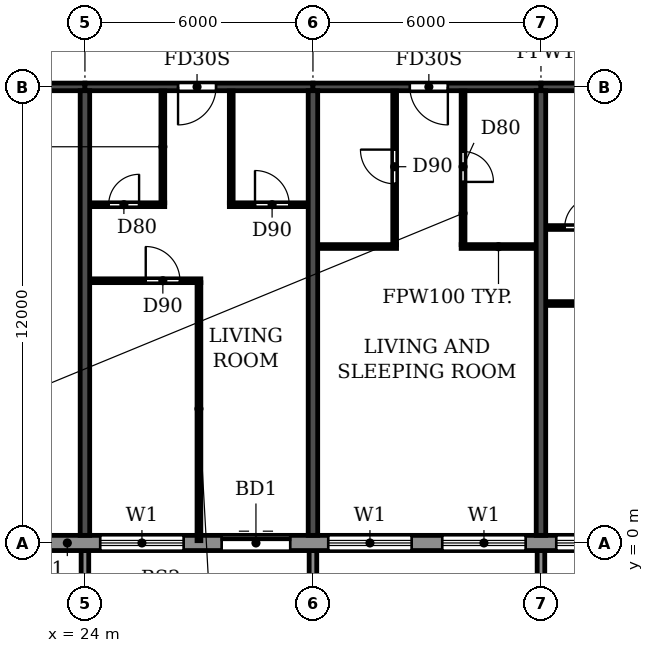
"""IFC4 building model, lengths in metres.
Left out: names, types, materials, properties, quantities, classifications, styles, units other than length and angle.
Written with IfcOpenShell. Run it as: python <this file> out.ifc"""

import sys

from ifc_helpers import new_model, si_unit, direction, frame, frame_2d, origin, place, context, subcontext, project, spatial, polyline, rectangle, outline, extrude, source, transform, mapped, element, fill, save


model = new_model("IFC4")
c1 = context("Model", 3, precision=1e-05, world=origin(), true_north=direction((0.0, 1.0)))
c2 = subcontext(c1, "Body", "Model", "MODEL_VIEW")
j1 = project(units=[si_unit("LENGTHUNIT", "METRE"), si_unit("PLANEANGLEUNIT", "RADIAN")], contexts=[c1])
p1 = place(None, origin())
s1 = spatial("IfcSite", under=j1, at=p1, CompositionType="ELEMENT")
p2 = place(p1, origin())
s2 = spatial("IfcBuilding", under=s1, at=p2, CompositionType="ELEMENT")
p3 = place(p2, frame((0.0, 0.0, 191.7)))
s3 = spatial("IfcBuildingStorey", under=s2, at=p3, CompositionType="ELEMENT", Elevation=191.7)
for number, where, z_axis, x_axis in (
    (1, (24.0, 0.2, 0.0), (0.0, 0.0, 1.0), (0.0, 1.0, 0.0)),
    (2, (30.0, 0.2, 0.0), (0.0, 0.0, 1.0), (0.0, 1.0, 0.0)),
    (3, (36.0, 0.2, 0.0), (0.0, 0.0, 1.0), (0.0, 1.0, 0.0)),
):
    element("IfcWall", number, at=place(p3, frame(where, z_axis=z_axis, x_axis=x_axis)), inside=s3, PredefinedType="SHEAR", context=c2, shape_type="SweptSolid", body=[
        extrude(rectangle(XDim=11.7, YDim=0.25, at=frame_2d((5.85, 0.0))), origin(), (0.0, 0.0, 1.0), 3.08),
    ])
p4 = place(p3, frame((18.2, 12.0, 0.0), z_axis=(0.0, 0.0, 1.0), x_axis=(1.0, 0.0, 0.0)))
e4 = element("IfcWall", 4, at=p4, inside=s3, PredefinedType="SHEAR", context=c2, shape_type="SweptSolid", body=[
    extrude(rectangle(XDim=5.8, YDim=0.2, at=frame_2d((2.9, 0.0))), origin(), (0.0, 0.0, 1.0), 2.48),
])
p5 = place(p4, frame((2.3, 0.0, 0.0)))
e5 = element("IfcOpeningElement", 5, at=p5, cuts=e4, PredefinedType="OPENING", context=c2, shape_type="SweptSolid", body=[
    extrude(rectangle(XDim=1.0, YDim=2.1, at=frame_2d((0.5, 1.05))), frame((0.0, 0.11, 0.0), z_axis=(0.0, -1.0, 0.0), x_axis=(1.0, 0.0, 0.0)), (0.0, 0.0, 1.0), 0.22),
])
p6 = place(p3, frame((24.0, 12.0, 0.0), z_axis=(0.0, 0.0, 1.0), x_axis=(1.0, 0.0, 0.0)))
e6 = element("IfcWall", 6, at=p6, inside=s3, PredefinedType="SHEAR", context=c2, shape_type="SweptSolid", body=[
    extrude(rectangle(XDim=6.0, YDim=0.2, at=frame_2d((3.0, 0.0))), origin(), (0.0, 0.0, 1.0), 2.48),
])
p7 = place(p6, frame((2.45, 0.0, 0.0)))
e7 = element("IfcOpeningElement", 7, at=p7, cuts=e6, PredefinedType="OPENING", context=c2, shape_type="SweptSolid", body=[
    extrude(rectangle(XDim=1.0, YDim=2.1, at=frame_2d((0.5, 1.05))), frame((0.0, 0.11, 0.0), z_axis=(0.0, -1.0, 0.0), x_axis=(1.0, 0.0, 0.0)), (0.0, 0.0, 1.0), 0.22),
])
p8 = place(p3, frame((30.0, 12.0, 0.0), z_axis=(0.0, 0.0, 1.0), x_axis=(1.0, 0.0, 0.0)))
e8 = element("IfcWall", 8, at=p8, inside=s3, PredefinedType="SHEAR", context=c2, shape_type="SweptSolid", body=[
    extrude(rectangle(XDim=6.0, YDim=0.2, at=frame_2d((3.0, 0.0))), origin(), (0.0, 0.0, 1.0), 2.48),
])
p9 = place(p8, frame((2.55, 0.0, 0.0)))
e9 = element("IfcOpeningElement", 9, at=p9, cuts=e8, PredefinedType="OPENING", context=c2, shape_type="SweptSolid", body=[
    extrude(rectangle(XDim=1.0, YDim=2.1, at=frame_2d((0.5, 1.05))), frame((0.0, 0.11, 0.0), z_axis=(0.0, -1.0, 0.0), x_axis=(1.0, 0.0, 0.0)), (0.0, 0.0, 1.0), 0.22),
])
p10 = place(p3, frame((36.0, 12.0, 0.0), z_axis=(0.0, 0.0, 1.0), x_axis=(1.0, 0.0, 0.0)))
e10 = element("IfcWall", 10, at=p10, inside=s3, PredefinedType="SHEAR", context=c2, shape_type="SweptSolid", body=[
    extrude(rectangle(XDim=6.0, YDim=0.2, at=frame_2d((3.0, 0.0))), origin(), (0.0, 0.0, 1.0), 2.48),
])
p11 = place(p10, frame((2.45, 0.0, 0.0)))
e11 = element("IfcOpeningElement", 11, at=p11, cuts=e10, PredefinedType="OPENING", context=c2, shape_type="SweptSolid", body=[
    extrude(rectangle(XDim=1.0, YDim=2.1, at=frame_2d((0.5, 1.05))), frame((0.0, 0.11, 0.0), z_axis=(0.0, -1.0, 0.0), x_axis=(1.0, 0.0, 0.0)), (0.0, 0.0, 1.0), 0.22),
])
p12 = place(p3, frame((22.683, 0.0, 0.0), z_axis=(0.0, 0.0, 1.0), x_axis=(1.0, 0.0, 0.0)))
e12 = element("IfcWall", 12, at=p12, inside=s3, PredefinedType="STANDARD", context=c2, shape_type="SweptSolid", body=[
    extrude(rectangle(XDim=56.634, YDim=0.4, at=frame_2d((28.317, 0.0))), origin(), (0.0, 0.0, 1.0), 3.08),
])
p13 = place(p12, frame((1.717, 0.0, 0.9)))
e13 = element("IfcOpeningElement", 13, at=p13, cuts=e12, PredefinedType="OPENING", context=c2, shape_type="SweptSolid", body=[
    extrude(rectangle(XDim=2.2, YDim=1.5, at=frame_2d((1.1, 0.75))), frame((0.0, 0.21, 0.0), z_axis=(0.0, -1.0, 0.0), x_axis=(1.0, 0.0, 0.0)), (0.0, 0.0, 1.0), 0.42),
])
p14 = place(p12, frame((4.917, 0.0, 0.0)))
e14 = element("IfcOpeningElement", 14, at=p14, cuts=e12, PredefinedType="OPENING", context=c2, shape_type="SweptSolid", body=[
    extrude(rectangle(XDim=1.8, YDim=2.4, at=frame_2d((0.9, 1.2))), frame((0.0, 0.21, 0.0), z_axis=(0.0, -1.0, 0.0), x_axis=(1.0, 0.0, 0.0)), (0.0, 0.0, 1.0), 0.42),
])
p15 = place(p12, frame((7.717, 0.0, 0.9)))
e15 = element("IfcOpeningElement", 15, at=p15, cuts=e12, PredefinedType="OPENING", context=c2, shape_type="SweptSolid", body=[
    extrude(rectangle(XDim=2.2, YDim=1.5, at=frame_2d((1.1, 0.75))), frame((0.0, 0.21, 0.0), z_axis=(0.0, -1.0, 0.0), x_axis=(1.0, 0.0, 0.0)), (0.0, 0.0, 1.0), 0.42),
])
p16 = place(p12, frame((10.717, 0.0, 0.9)))
e16 = element("IfcOpeningElement", 16, at=p16, cuts=e12, PredefinedType="OPENING", context=c2, shape_type="SweptSolid", body=[
    extrude(rectangle(XDim=2.2, YDim=1.5, at=frame_2d((1.1, 0.75))), frame((0.0, 0.21, 0.0), z_axis=(0.0, -1.0, 0.0), x_axis=(1.0, 0.0, 0.0)), (0.0, 0.0, 1.0), 0.42),
])
p17 = place(p12, frame((13.717, 0.0, 0.9)))
e17 = element("IfcOpeningElement", 17, at=p17, cuts=e12, PredefinedType="OPENING", context=c2, shape_type="SweptSolid", body=[
    extrude(rectangle(XDim=2.2, YDim=1.5, at=frame_2d((1.1, 0.75))), frame((0.0, 0.21, 0.0), z_axis=(0.0, -1.0, 0.0), x_axis=(1.0, 0.0, 0.0)), (0.0, 0.0, 1.0), 0.42),
])
p18 = place(p12, frame((16.917, 0.0, 0.0)))
e18 = element("IfcOpeningElement", 18, at=p18, cuts=e12, PredefinedType="OPENING", context=c2, shape_type="SweptSolid", body=[
    extrude(rectangle(XDim=1.8, YDim=2.4, at=frame_2d((0.9, 1.2))), frame((0.0, 0.21, 0.0), z_axis=(0.0, -1.0, 0.0), x_axis=(1.0, 0.0, 0.0)), (0.0, 0.0, 1.0), 0.42),
])
p19 = place(p12, frame((19.717, 0.0, 0.9)))
e19 = element("IfcOpeningElement", 19, at=p19, cuts=e12, PredefinedType="OPENING", context=c2, shape_type="SweptSolid", body=[
    extrude(rectangle(XDim=2.2, YDim=1.5, at=frame_2d((1.1, 0.75))), frame((0.0, 0.21, 0.0), z_axis=(0.0, -1.0, 0.0), x_axis=(1.0, 0.0, 0.0)), (0.0, 0.0, 1.0), 0.42),
])
p20 = place(p12, frame((22.717, 0.0, 0.9)))
e20 = element("IfcOpeningElement", 20, at=p20, cuts=e12, PredefinedType="OPENING", context=c2, shape_type="SweptSolid", body=[
    extrude(rectangle(XDim=2.2, YDim=1.5, at=frame_2d((1.1, 0.75))), frame((0.0, 0.21, 0.0), z_axis=(0.0, -1.0, 0.0), x_axis=(1.0, 0.0, 0.0)), (0.0, 0.0, 1.0), 0.42),
])
p21 = place(p12, frame((25.917, 0.0, 0.0)))
e21 = element("IfcOpeningElement", 21, at=p21, cuts=e12, PredefinedType="OPENING", context=c2, shape_type="SweptSolid", body=[
    extrude(rectangle(XDim=1.8, YDim=2.4, at=frame_2d((0.9, 1.2))), frame((0.0, 0.21, 0.0), z_axis=(0.0, -1.0, 0.0), x_axis=(1.0, 0.0, 0.0)), (0.0, 0.0, 1.0), 0.42),
])
p22 = place(p12, frame((28.717, 0.0, 0.9)))
e22 = element("IfcOpeningElement", 22, at=p22, cuts=e12, PredefinedType="OPENING", context=c2, shape_type="SweptSolid", body=[
    extrude(rectangle(XDim=2.2, YDim=1.5, at=frame_2d((1.1, 0.75))), frame((0.0, 0.21, 0.0), z_axis=(0.0, -1.0, 0.0), x_axis=(1.0, 0.0, 0.0)), (0.0, 0.0, 1.0), 0.42),
])
p23 = place(p12, frame((31.717, 0.0, 0.9)))
e23 = element("IfcOpeningElement", 23, at=p23, cuts=e12, PredefinedType="OPENING", context=c2, shape_type="SweptSolid", body=[
    extrude(rectangle(XDim=2.2, YDim=1.5, at=frame_2d((1.1, 0.75))), frame((0.0, 0.21, 0.0), z_axis=(0.0, -1.0, 0.0), x_axis=(1.0, 0.0, 0.0)), (0.0, 0.0, 1.0), 0.42),
])
p24 = place(p12, frame((34.717, 0.0, 0.9)))
e24 = element("IfcOpeningElement", 24, at=p24, cuts=e12, PredefinedType="OPENING", context=c2, shape_type="SweptSolid", body=[
    extrude(rectangle(XDim=2.2, YDim=1.5, at=frame_2d((1.1, 0.75))), frame((0.0, 0.21, 0.0), z_axis=(0.0, -1.0, 0.0), x_axis=(1.0, 0.0, 0.0)), (0.0, 0.0, 1.0), 0.42),
])
p25 = place(p12, frame((37.717, 0.0, 0.9)))
e25 = element("IfcOpeningElement", 25, at=p25, cuts=e12, PredefinedType="OPENING", context=c2, shape_type="SweptSolid", body=[
    extrude(rectangle(XDim=2.2, YDim=1.5, at=frame_2d((1.1, 0.75))), frame((0.0, 0.21, 0.0), z_axis=(0.0, -1.0, 0.0), x_axis=(1.0, 0.0, 0.0)), (0.0, 0.0, 1.0), 0.42),
])
p26 = place(p12, frame((40.917, 0.0, 0.0)))
e26 = element("IfcOpeningElement", 26, at=p26, cuts=e12, PredefinedType="OPENING", context=c2, shape_type="SweptSolid", body=[
    extrude(rectangle(XDim=1.8, YDim=2.4, at=frame_2d((0.9, 1.2))), frame((0.0, 0.21, 0.0), z_axis=(0.0, -1.0, 0.0), x_axis=(1.0, 0.0, 0.0)), (0.0, 0.0, 1.0), 0.42),
])
p27 = place(p12, frame((43.717, 0.0, 0.9)))
e27 = element("IfcOpeningElement", 27, at=p27, cuts=e12, PredefinedType="OPENING", context=c2, shape_type="SweptSolid", body=[
    extrude(rectangle(XDim=2.2, YDim=1.5, at=frame_2d((1.1, 0.75))), frame((0.0, 0.21, 0.0), z_axis=(0.0, -1.0, 0.0), x_axis=(1.0, 0.0, 0.0)), (0.0, 0.0, 1.0), 0.42),
])
p28 = place(p12, frame((46.717, 0.0, 0.9)))
e28 = element("IfcOpeningElement", 28, at=p28, cuts=e12, PredefinedType="OPENING", context=c2, shape_type="SweptSolid", body=[
    extrude(rectangle(XDim=2.2, YDim=1.5, at=frame_2d((1.1, 0.75))), frame((0.0, 0.21, 0.0), z_axis=(0.0, -1.0, 0.0), x_axis=(1.0, 0.0, 0.0)), (0.0, 0.0, 1.0), 0.42),
])
p29 = place(p12, frame((49.917, 0.0, 0.0)))
e29 = element("IfcOpeningElement", 29, at=p29, cuts=e12, PredefinedType="OPENING", context=c2, shape_type="SweptSolid", body=[
    extrude(rectangle(XDim=1.8, YDim=2.4, at=frame_2d((0.9, 1.2))), frame((0.0, 0.21, 0.0), z_axis=(0.0, -1.0, 0.0), x_axis=(1.0, 0.0, 0.0)), (0.0, 0.0, 1.0), 0.42),
])
p30 = place(p12, frame((52.717, 0.0, 0.9)))
e30 = element("IfcOpeningElement", 30, at=p30, cuts=e12, PredefinedType="OPENING", context=c2, shape_type="SweptSolid", body=[
    extrude(rectangle(XDim=2.2, YDim=1.5, at=frame_2d((1.1, 0.75))), frame((0.0, 0.21, 0.0), z_axis=(0.0, -1.0, 0.0), x_axis=(1.0, 0.0, 0.0)), (0.0, 0.0, 1.0), 0.42),
])
m1 = source(origin(), c2, "Body", "SweptSolid", [
    extrude(outline(polyline([(0.0, 0.0), (0.2, 0.0), (0.2, 1.65), (0.0, 1.65), (0.0, 0.0)])), origin(), (0.0, 0.0, 1.0), 3.1),
])
for number, where in (
    (31, (23.9, -1.85, 0.0)),
    (32, (29.9, -1.85, 0.0)),
    (33, (35.9, -1.85, 0.0)),
):
    element("IfcWall", number, at=place(p3, frame(where)), inside=s3, PredefinedType="STANDARD", context=c2, shape_type="MappedRepresentation", body=[
        mapped(m1, transform((0.0, 0.0, 0.0))),
    ])
p31 = place(p3, frame((36.135, 6.3, 0.0), z_axis=(0.0, 0.0, 1.0), x_axis=(1.0, 0.0, 0.0)))
e34 = element("IfcWall", 34, at=p31, inside=s3, PredefinedType="PARTITIONING", context=c2, shape_type="SweptSolid", body=[
    extrude(rectangle(XDim=2.915, YDim=0.1, at=frame_2d((1.458, 0.0))), origin(), (0.0, 0.0, 1.0), 3.08),
])
p32 = place(p31, frame((1.465, 0.0, 0.0)))
e35 = element("IfcOpeningElement", 35, at=p32, cuts=e34, PredefinedType="OPENING", context=c2, shape_type="SweptSolid", body=[
    extrude(rectangle(XDim=0.9, YDim=2.1, at=frame_2d((0.45, 1.05))), frame((0.0, 0.06, 0.0), z_axis=(0.0, -1.0, 0.0), x_axis=(1.0, 0.0, 0.0)), (0.0, 0.0, 1.0), 0.12),
])
p33 = place(p3, frame((24.135, 6.9, 0.0), z_axis=(0.0, 0.0, 1.0), x_axis=(1.0, 0.0, 0.0)))
e36 = element("IfcWall", 36, at=p33, inside=s3, PredefinedType="PARTITIONING", context=c2, shape_type="SweptSolid", body=[
    extrude(rectangle(XDim=2.915, YDim=0.1, at=frame_2d((1.458, 0.0))), origin(), (0.0, 0.0, 1.0), 3.08),
])
p34 = place(p33, frame((1.465, 0.0, 0.0)))
e37 = element("IfcOpeningElement", 37, at=p34, cuts=e36, PredefinedType="OPENING", context=c2, shape_type="SweptSolid", body=[
    extrude(rectangle(XDim=0.9, YDim=2.1, at=frame_2d((0.45, 1.05))), frame((0.0, 0.06, 0.0), z_axis=(0.0, -1.0, 0.0), x_axis=(1.0, 0.0, 0.0)), (0.0, 0.0, 1.0), 0.12),
])
p35 = place(p3, frame((30.135, 7.8, 0.0), z_axis=(0.0, 0.0, 1.0), x_axis=(1.0, 0.0, 0.0)))
e38 = element("IfcWall", 38, at=p35, inside=s3, PredefinedType="PARTITIONING", context=c2, shape_type="SweptSolid", body=[
    extrude(rectangle(XDim=2.065, YDim=0.1, at=frame_2d((1.032, 0.0))), origin(), (0.0, 0.0, 1.0), 3.08),
])
p36 = place(p3, frame((33.9, 7.8, 0.0), z_axis=(0.0, 0.0, 1.0), x_axis=(1.0, 0.0, 0.0)))
e39 = element("IfcWall", 39, at=p36, inside=s3, PredefinedType="PARTITIONING", context=c2, shape_type="SweptSolid", body=[
    extrude(rectangle(XDim=1.965, YDim=0.1, at=frame_2d((0.982, 0.0))), origin(), (0.0, 0.0, 1.0), 3.08),
])
p37 = place(p3, frame((36.135, 8.3, 0.0), z_axis=(0.0, 0.0, 1.0), x_axis=(1.0, 0.0, 0.0)))
e40 = element("IfcWall", 40, at=p37, inside=s3, PredefinedType="PARTITIONING", context=c2, shape_type="SweptSolid", body=[
    extrude(rectangle(XDim=1.965, YDim=0.1, at=frame_2d((0.982, 0.0))), origin(), (0.0, 0.0, 1.0), 3.08),
])
p38 = place(p37, frame((0.49, 0.0, 0.0)))
e41 = element("IfcOpeningElement", 41, at=p38, cuts=e40, PredefinedType="OPENING", context=c2, shape_type="SweptSolid", body=[
    extrude(rectangle(XDim=0.8, YDim=2.1, at=frame_2d((0.4, 1.05))), frame((0.0, 0.06, 0.0), z_axis=(0.0, -1.0, 0.0), x_axis=(1.0, 0.0, 0.0)), (0.0, 0.0, 1.0), 0.12),
])
p39 = place(p3, frame((24.135, 8.9, 0.0), z_axis=(0.0, 0.0, 1.0), x_axis=(1.0, 0.0, 0.0)))
e42 = element("IfcWall", 42, at=p39, inside=s3, PredefinedType="PARTITIONING", context=c2, shape_type="SweptSolid", body=[
    extrude(rectangle(XDim=1.965, YDim=0.1, at=frame_2d((0.982, 0.0))), origin(), (0.0, 0.0, 1.0), 3.08),
])
p40 = place(p39, frame((0.49, 0.0, 0.0)))
e43 = element("IfcOpeningElement", 43, at=p40, cuts=e42, PredefinedType="OPENING", context=c2, shape_type="SweptSolid", body=[
    extrude(rectangle(XDim=0.8, YDim=2.1, at=frame_2d((0.4, 1.05))), frame((0.0, 0.06, 0.0), z_axis=(0.0, -1.0, 0.0), x_axis=(1.0, 0.0, 0.0)), (0.0, 0.0, 1.0), 0.12),
])
p41 = place(p3, frame((27.8, 8.9, 0.0), z_axis=(0.0, 0.0, 1.0), x_axis=(1.0, 0.0, 0.0)))
e44 = element("IfcWall", 44, at=p41, inside=s3, PredefinedType="PARTITIONING", context=c2, shape_type="SweptSolid", body=[
    extrude(rectangle(XDim=2.065, YDim=0.1, at=frame_2d((1.032, 0.0))), origin(), (0.0, 0.0, 1.0), 3.08),
])
p42 = place(p41, frame((0.675, 0.0, 0.0)))
e45 = element("IfcOpeningElement", 45, at=p42, cuts=e44, PredefinedType="OPENING", context=c2, shape_type="SweptSolid", body=[
    extrude(rectangle(XDim=0.9, YDim=2.1, at=frame_2d((0.45, 1.05))), frame((0.0, 0.06, 0.0), z_axis=(0.0, -1.0, 0.0), x_axis=(1.0, 0.0, 0.0)), (0.0, 0.0, 1.0), 0.12),
])
p43 = place(p3, frame((26.05, 8.95, 0.0), z_axis=(0.0, 0.0, 1.0), x_axis=(0.0, 1.0, 0.0)))
e46 = element("IfcWall", 46, at=p43, inside=s3, PredefinedType="PARTITIONING", context=c2, shape_type="SweptSolid", body=[
    extrude(rectangle(XDim=2.94, YDim=0.1, at=frame_2d((1.47, 0.0))), origin(), (0.0, 0.0, 1.0), 3.08),
])
p44 = place(p3, frame((27.0, 0.06, 0.0), z_axis=(0.0, 0.0, 1.0), x_axis=(0.0, 1.0, 0.0)))
e47 = element("IfcWall", 47, at=p44, inside=s3, PredefinedType="PARTITIONING", context=c2, shape_type="SweptSolid", body=[
    extrude(rectangle(XDim=6.79, YDim=0.1, at=frame_2d((3.395, 0.0))), origin(), (0.0, 0.0, 1.0), 3.08),
])
p45 = place(p3, frame((27.85, 8.95, 0.0), z_axis=(0.0, 0.0, 1.0), x_axis=(0.0, 1.0, 0.0)))
e48 = element("IfcWall", 48, at=p45, inside=s3, PredefinedType="PARTITIONING", context=c2, shape_type="SweptSolid", body=[
    extrude(rectangle(XDim=2.94, YDim=0.1, at=frame_2d((1.47, 0.0))), origin(), (0.0, 0.0, 1.0), 3.08),
])
p46 = place(p3, frame((32.15, 7.85, 0.0), z_axis=(0.0, 0.0, 1.0), x_axis=(0.0, 1.0, 0.0)))
e49 = element("IfcWall", 49, at=p46, inside=s3, PredefinedType="PARTITIONING", context=c2, shape_type="SweptSolid", body=[
    extrude(rectangle(XDim=4.04, YDim=0.1, at=frame_2d((2.02, 0.0))), origin(), (0.0, 0.0, 1.0), 3.08),
])
p47 = place(p46, frame((1.6, 0.0, 0.0)))
e50 = element("IfcOpeningElement", 50, at=p47, cuts=e49, PredefinedType="OPENING", context=c2, shape_type="SweptSolid", body=[
    extrude(rectangle(XDim=0.9, YDim=2.1, at=frame_2d((0.45, 1.05))), frame((0.0, 0.06, 0.0), z_axis=(0.0, -1.0, 0.0), x_axis=(1.0, 0.0, 0.0)), (0.0, 0.0, 1.0), 0.12),
])
p48 = place(p3, frame((33.95, 7.85, 0.0), z_axis=(0.0, 0.0, 1.0), x_axis=(0.0, 1.0, 0.0)))
e51 = element("IfcWall", 51, at=p48, inside=s3, PredefinedType="PARTITIONING", context=c2, shape_type="SweptSolid", body=[
    extrude(rectangle(XDim=4.04, YDim=0.1, at=frame_2d((2.02, 0.0))), origin(), (0.0, 0.0, 1.0), 3.08),
])
p49 = place(p48, frame((1.65, 0.0, 0.0)))
e52 = element("IfcOpeningElement", 52, at=p49, cuts=e51, PredefinedType="OPENING", context=c2, shape_type="SweptSolid", body=[
    extrude(rectangle(XDim=0.8, YDim=2.1, at=frame_2d((0.4, 1.05))), frame((0.0, 0.06, 0.0), z_axis=(0.0, -1.0, 0.0), x_axis=(1.0, 0.0, 0.0)), (0.0, 0.0, 1.0), 0.12),
])
p50 = place(p13, origin())
e53 = element("IfcWindow", 53, at=p50, inside=s3, PartitioningType="DOUBLE_PANEL_HORIZONTAL", PredefinedType="WINDOW", context=c2, shape_type="SweptSolid", body=[
    extrude(rectangle(XDim=2.2, YDim=1.5, at=frame_2d((1.1, 0.75))), frame((0.0, 0.03, 0.0), z_axis=(0.0, -1.0, 0.0), x_axis=(1.0, 0.0, 0.0)), (0.0, 0.0, 1.0), 0.06),
])
fill(e13, e53)
p51 = place(p14, origin())
e54 = element("IfcDoor", 54, at=p51, inside=s3, OperationType="DOUBLE_DOOR_SLIDING", PredefinedType="DOOR", context=c2, shape_type="SweptSolid", body=[
    extrude(rectangle(XDim=1.8, YDim=2.4, at=frame_2d((0.9, 1.2))), frame((0.0, 0.025, 0.0), z_axis=(0.0, -1.0, 0.0), x_axis=(1.0, 0.0, 0.0)), (0.0, 0.0, 1.0), 0.05),
])
fill(e14, e54)
p52 = place(p15, origin())
e55 = element("IfcWindow", 55, at=p52, inside=s3, PartitioningType="DOUBLE_PANEL_HORIZONTAL", PredefinedType="WINDOW", context=c2, shape_type="SweptSolid", body=[
    extrude(rectangle(XDim=2.2, YDim=1.5, at=frame_2d((1.1, 0.75))), frame((0.0, 0.03, 0.0), z_axis=(0.0, -1.0, 0.0), x_axis=(1.0, 0.0, 0.0)), (0.0, 0.0, 1.0), 0.06),
])
fill(e15, e55)
p53 = place(p16, origin())
e56 = element("IfcWindow", 56, at=p53, inside=s3, PartitioningType="DOUBLE_PANEL_HORIZONTAL", PredefinedType="WINDOW", context=c2, shape_type="SweptSolid", body=[
    extrude(rectangle(XDim=2.2, YDim=1.5, at=frame_2d((1.1, 0.75))), frame((0.0, 0.03, 0.0), z_axis=(0.0, -1.0, 0.0), x_axis=(1.0, 0.0, 0.0)), (0.0, 0.0, 1.0), 0.06),
])
fill(e16, e56)
p54 = place(p17, origin())
e57 = element("IfcWindow", 57, at=p54, inside=s3, PartitioningType="DOUBLE_PANEL_HORIZONTAL", PredefinedType="WINDOW", context=c2, shape_type="SweptSolid", body=[
    extrude(rectangle(XDim=2.2, YDim=1.5, at=frame_2d((1.1, 0.75))), frame((0.0, 0.03, 0.0), z_axis=(0.0, -1.0, 0.0), x_axis=(1.0, 0.0, 0.0)), (0.0, 0.0, 1.0), 0.06),
])
fill(e17, e57)
p55 = place(p40, origin())
e58 = element("IfcDoor", 58, at=p55, inside=s3, OperationType="SINGLE_SWING_RIGHT", PredefinedType="DOOR", context=c2, shape_type="SweptSolid", body=[
    extrude(rectangle(XDim=0.8, YDim=2.1, at=frame_2d((0.4, 1.05))), frame((0.0, 0.025, 0.0), z_axis=(0.0, -1.0, 0.0), x_axis=(1.0, 0.0, 0.0)), (0.0, 0.0, 1.0), 0.05),
])
fill(e43, e58)
p56 = place(p34, origin())
e59 = element("IfcDoor", 59, at=p56, inside=s3, OperationType="SINGLE_SWING_LEFT", PredefinedType="DOOR", context=c2, shape_type="SweptSolid", body=[
    extrude(rectangle(XDim=0.9, YDim=2.1, at=frame_2d((0.45, 1.05))), frame((0.0, 0.025, 0.0), z_axis=(0.0, -1.0, 0.0), x_axis=(1.0, 0.0, 0.0)), (0.0, 0.0, 1.0), 0.05),
])
fill(e37, e59)
p57 = place(p7, frame((1.0, 0.0, 0.0), z_axis=(0.0, 0.0, 1.0), x_axis=(-1.0, 0.0, 0.0)))
e60 = element("IfcDoor", 60, at=p57, inside=s3, OperationType="SINGLE_SWING_RIGHT", PredefinedType="DOOR", context=c2, shape_type="SweptSolid", body=[
    extrude(rectangle(XDim=1.0, YDim=2.1, at=frame_2d((0.5, 1.05))), frame((0.0, 0.025, 0.0), z_axis=(0.0, -1.0, 0.0), x_axis=(1.0, 0.0, 0.0)), (0.0, 0.0, 1.0), 0.05),
])
fill(e7, e60)
p58 = place(p42, origin())
e61 = element("IfcDoor", 61, at=p58, inside=s3, OperationType="SINGLE_SWING_LEFT", PredefinedType="DOOR", context=c2, shape_type="SweptSolid", body=[
    extrude(rectangle(XDim=0.9, YDim=2.1, at=frame_2d((0.45, 1.05))), frame((0.0, 0.025, 0.0), z_axis=(0.0, -1.0, 0.0), x_axis=(1.0, 0.0, 0.0)), (0.0, 0.0, 1.0), 0.05),
])
fill(e45, e61)
p59 = place(p47, origin())
e62 = element("IfcDoor", 62, at=p59, inside=s3, OperationType="SINGLE_SWING_RIGHT", PredefinedType="DOOR", context=c2, shape_type="SweptSolid", body=[
    extrude(rectangle(XDim=0.9, YDim=2.1, at=frame_2d((0.45, 1.05))), frame((0.0, 0.025, 0.0), z_axis=(0.0, -1.0, 0.0), x_axis=(1.0, 0.0, 0.0)), (0.0, 0.0, 1.0), 0.05),
])
fill(e50, e62)
p60 = place(p9, frame((1.0, 0.0, 0.0), z_axis=(0.0, 0.0, 1.0), x_axis=(-1.0, 0.0, 0.0)))
e63 = element("IfcDoor", 63, at=p60, inside=s3, OperationType="SINGLE_SWING_LEFT", PredefinedType="DOOR", context=c2, shape_type="SweptSolid", body=[
    extrude(rectangle(XDim=1.0, YDim=2.1, at=frame_2d((0.5, 1.05))), frame((0.0, 0.025, 0.0), z_axis=(0.0, -1.0, 0.0), x_axis=(1.0, 0.0, 0.0)), (0.0, 0.0, 1.0), 0.05),
])
fill(e9, e63)
p61 = place(p49, frame((0.8, 0.0, 0.0), z_axis=(0.0, 0.0, 1.0), x_axis=(-1.0, 0.0, 0.0)))
e64 = element("IfcDoor", 64, at=p61, inside=s3, OperationType="SINGLE_SWING_RIGHT", PredefinedType="DOOR", context=c2, shape_type="SweptSolid", body=[
    extrude(rectangle(XDim=0.8, YDim=2.1, at=frame_2d((0.4, 1.05))), frame((0.0, 0.025, 0.0), z_axis=(0.0, -1.0, 0.0), x_axis=(1.0, 0.0, 0.0)), (0.0, 0.0, 1.0), 0.05),
])
fill(e52, e64)
p62 = place(p38, origin())
e65 = element("IfcDoor", 65, at=p62, inside=s3, OperationType="SINGLE_SWING_RIGHT", PredefinedType="DOOR", context=c2, shape_type="SweptSolid", body=[
    extrude(rectangle(XDim=0.8, YDim=2.1, at=frame_2d((0.4, 1.05))), frame((0.0, 0.025, 0.0), z_axis=(0.0, -1.0, 0.0), x_axis=(1.0, 0.0, 0.0)), (0.0, 0.0, 1.0), 0.05),
])
fill(e41, e65)
save(model, sys.argv[1])
